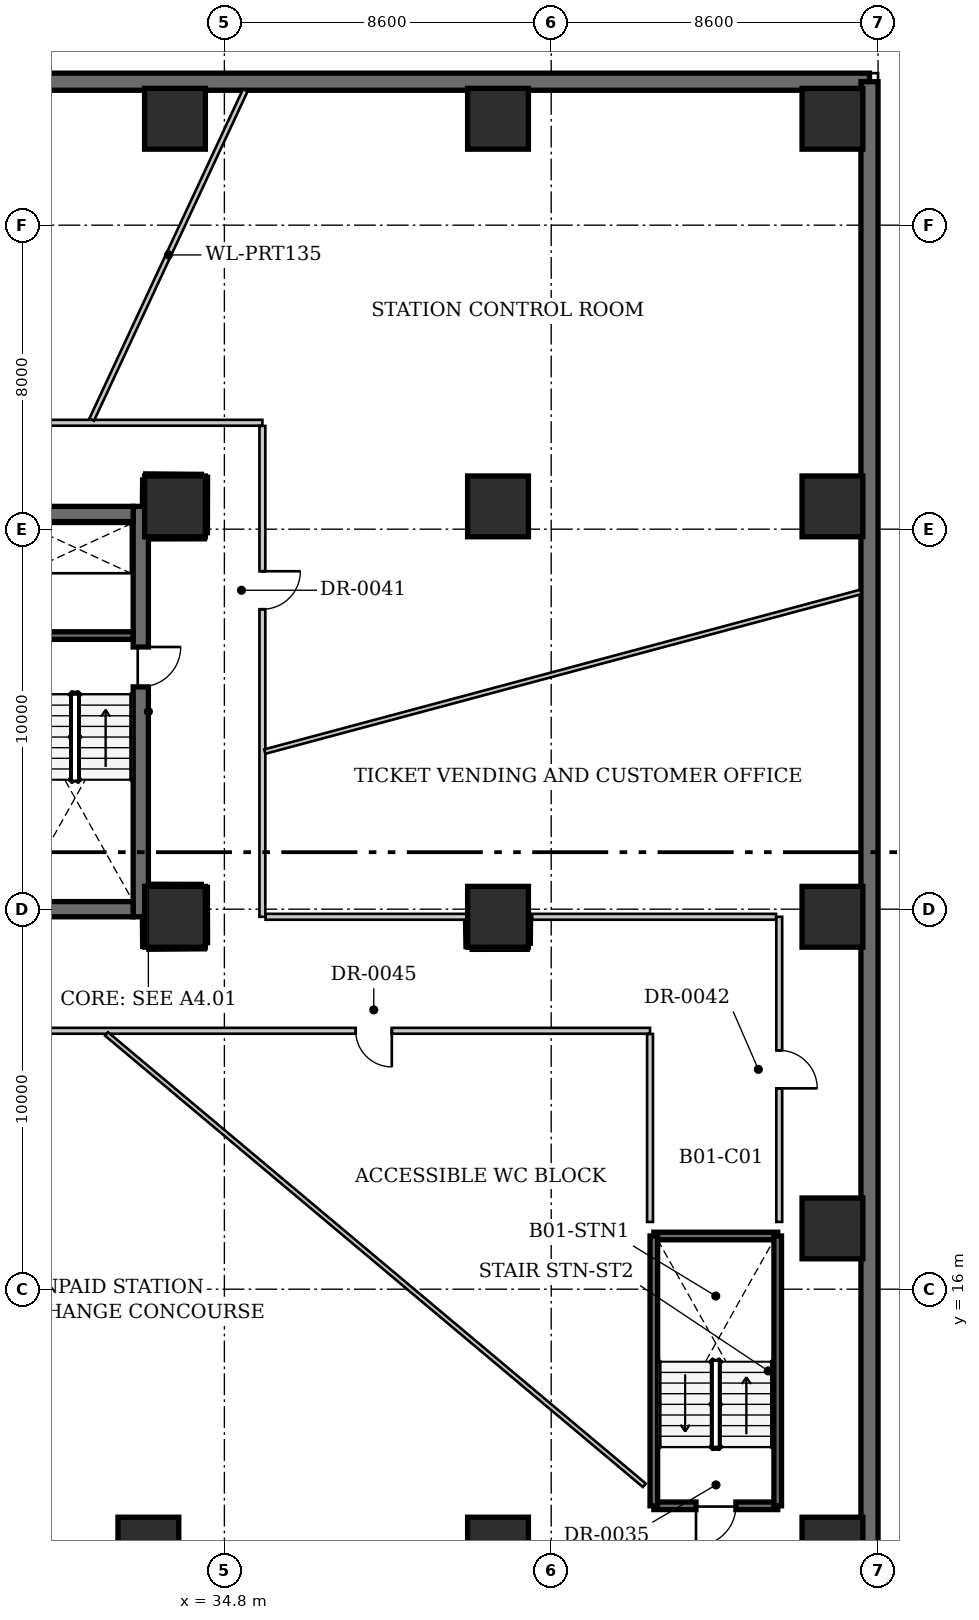
"""IFC4 building model, lengths in metres.
Left out: names, types, materials, properties, quantities, classifications, styles, units other than length and angle.
Written with IfcOpenShell. Run it as: python <this file> out.ifc"""

import sys

from ifc_helpers import new_model, si_unit, direction, frame, frame_2d, origin, origin_2d, place, context, subcontext, project, spatial, rectangle, extrude, source, transform, mapped, element, fill, save


model = new_model("IFC4")
c1 = context("Model", 3, precision=1e-05, world=origin(), true_north=direction((0.0, 1.0)))
c2 = subcontext(c1, "Body", "Model", "MODEL_VIEW")
j1 = project(units=[si_unit("LENGTHUNIT", "METRE"), si_unit("PLANEANGLEUNIT", "RADIAN")], contexts=[c1])
p1 = place(None, origin())
s1 = spatial("IfcSite", under=j1, at=p1, CompositionType="ELEMENT")
p2 = place(p1, origin())
s2 = spatial("IfcBuilding", under=s1, at=p2, CompositionType="ELEMENT")
p3 = place(p2, frame((0.0, 0.0, -5.8)))
s3 = spatial("IfcBuildingStorey", under=s2, at=p3, CompositionType="ELEMENT", Elevation=-5.8)
for number, where, z_axis, x_axis in (
    (1, (50.8, 9.2, 0.0), (0.0, 0.0, 1.0), (1.0, 0.0, 0.0)),
    (2, (50.8, 17.6, 0.0), (0.0, 0.0, 1.0), (1.0, 0.0, 0.0)),
    (3, (50.8, 25.8, 0.0), (0.0, 0.0, 1.0), (1.0, 0.0, 0.0)),
    (4, (50.8, 36.6, 0.0), (0.0, 0.0, 1.0), (1.0, 0.0, 0.0)),
    (5, (50.8, 46.8, 0.0), (0.0, 0.0, 1.0), (1.0, 0.0, 0.0)),
    (6, (32.8, 9.2, 0.0), (0.0, 0.0, 1.0), (1.0, 0.0, 0.0)),
    (7, (42.0, 9.2, 0.0), (0.0, 0.0, 1.0), (1.0, 0.0, 0.0)),
    (8, (33.5, 46.8, 0.0), (0.0, 0.0, 1.0), (1.0, 0.0, 0.0)),
    (9, (42.0, 46.8, 0.0), (0.0, 0.0, 1.0), (1.0, 0.0, 0.0)),
    (10, (33.5, 25.8, 0.0), (0.0, 0.0, 1.0), (1.0, 0.0, 0.0)),
    (11, (33.5, 36.6, 0.0), (0.0, 0.0, 1.0), (1.0, 0.0, 0.0)),
    (12, (42.0, 25.8, 0.0), (0.0, 0.0, 1.0), (1.0, 0.0, 0.0)),
    (13, (42.0, 36.6, 0.0), (0.0, 0.0, 1.0), (1.0, 0.0, 0.0)),
):
    element("IfcColumn", number, at=place(p3, frame(where, z_axis=z_axis, x_axis=x_axis)), inside=s3, PredefinedType="COLUMN", context=c2, shape_type="SweptSolid", body=[
        extrude(rectangle(XDim=1.6, YDim=1.6, at=origin_2d()), origin(), (0.0, 0.0, 1.0), 5.45),
    ])
p4 = place(p3, frame((0.225, 47.775, 0.0), z_axis=(0.0, 0.0, 1.0), x_axis=(1.0, 0.0, 0.0)))
e14 = element("IfcWall", 14, at=p4, inside=s3, PredefinedType="SHEAR", context=c2, shape_type="SweptSolid", body=[
    extrude(rectangle(XDim=51.55, YDim=0.45, at=frame_2d((25.775, 0.0))), origin(), (0.0, 0.0, 1.0), 5.8),
])
p5 = place(p3, frame((51.775, 47.775, 0.0), z_axis=(0.0, 0.0, 1.0), x_axis=(0.0, -1.0, 0.0)))
e15 = element("IfcWall", 15, at=p5, inside=s3, PredefinedType="SHEAR", context=c2, shape_type="SweptSolid", body=[
    extrude(rectangle(XDim=39.55, YDim=0.45, at=frame_2d((19.775, 0.0))), origin(), (0.0, 0.0, 1.0), 5.8),
])
p6 = place(p3, frame((32.6, 36.6, 0.0), z_axis=(0.0, 0.0, 1.0), x_axis=(0.0, -1.0, 0.0)))
e16 = element("IfcWall", 16, at=p6, inside=s3, PredefinedType="SHEAR", context=c2, shape_type="SweptSolid", body=[
    extrude(rectangle(XDim=10.8, YDim=0.4, at=frame_2d((5.4, 0.0))), origin(), (0.0, 0.0, 1.0), 5.8),
])
p7 = place(p6, frame((3.7, 0.0, 0.0)))
e17 = element("IfcOpeningElement", 17, at=p7, cuts=e16, PredefinedType="OPENING", context=c2, shape_type="SweptSolid", body=[
    extrude(rectangle(XDim=1.05, YDim=2.15, at=frame_2d((0.525, 1.075))), frame((0.0, 0.21, 0.0), z_axis=(0.0, -1.0, 0.0), x_axis=(1.0, 0.0, 0.0)), (0.0, 0.0, 1.0), 0.42),
])
p8 = place(p3, frame((19.6, 36.4, 0.0), z_axis=(0.0, 0.0, 1.0), x_axis=(1.0, 0.0, 0.0)))
e18 = element("IfcWall", 18, at=p8, inside=s3, PredefinedType="SHEAR", context=c2, shape_type="SweptSolid", body=[
    extrude(rectangle(XDim=12.8, YDim=0.4, at=frame_2d((6.4, 0.0))), origin(), (0.0, 0.0, 1.0), 5.8),
])
p9 = place(p3, frame((32.4, 26.0, 0.0), z_axis=(0.0, 0.0, 1.0), x_axis=(-1.0, 0.0, 0.0)))
e19 = element("IfcWall", 19, at=p9, inside=s3, PredefinedType="SHEAR", context=c2, shape_type="SweptSolid", body=[
    extrude(rectangle(XDim=12.8, YDim=0.4, at=frame_2d((6.4, 0.0))), origin(), (0.0, 0.0, 1.0), 5.8),
])
p10 = place(p9, frame((10.75, 0.0, 0.0)))
e20 = element("IfcOpeningElement", 20, at=p10, cuts=e19, PredefinedType="OPENING", context=c2, shape_type="SweptSolid", body=[
    extrude(rectangle(XDim=1.05, YDim=2.15, at=frame_2d((0.525, 1.075))), frame((0.0, 0.21, 0.0), z_axis=(0.0, -1.0, 0.0), x_axis=(1.0, 0.0, 0.0)), (0.0, 0.0, 1.0), 0.42),
])
p11 = place(p9, frame((5.67, 0.0, 0.0)))
e21 = element("IfcOpeningElement", 21, at=p11, cuts=e19, PredefinedType="OPENING", context=c2, shape_type="SweptSolid", body=[
    extrude(rectangle(XDim=1.45, YDim=2.2, at=frame_2d((0.725, 1.1))), frame((0.0, 0.21, 0.0), z_axis=(0.0, -1.0, 0.0), x_axis=(1.0, 0.0, 0.0)), (0.0, 0.0, 1.0), 0.42),
])
p12 = place(p3, frame((29.34, 33.2, 0.0), z_axis=(0.0, 0.0, 1.0), x_axis=(1.0, 0.0, 0.0)))
e22 = element("IfcWall", 22, at=p12, inside=s3, PredefinedType="SHEAR", context=c2, shape_type="SweptSolid", body=[
    extrude(rectangle(XDim=3.06, YDim=0.2, at=frame_2d((1.53, 0.0))), origin(), (0.0, 0.0, 1.0), 5.8),
])
p13 = place(p3, frame((49.36, 10.3, 0.0), z_axis=(0.0, 0.0, 1.0), x_axis=(-1.0, 0.0, 0.0)))
e23 = element("IfcWall", 23, at=p13, inside=s3, PredefinedType="SHEAR", context=c2, shape_type="SweptSolid", body=[
    extrude(rectangle(XDim=3.26, YDim=0.2, at=frame_2d((1.63, 0.0))), origin(), (0.0, 0.0, 1.0), 5.8),
])
p14 = place(p13, frame((1.1, 0.0, 0.0)))
e24 = element("IfcOpeningElement", 24, at=p14, cuts=e23, PredefinedType="OPENING", context=c2, shape_type="SweptSolid", body=[
    extrude(rectangle(XDim=1.05, YDim=2.15, at=frame_2d((0.525, 1.075))), frame((0.0, 0.11, 0.0), z_axis=(0.0, -1.0, 0.0), x_axis=(1.0, 0.0, 0.0)), (0.0, 0.0, 1.0), 0.22),
])
p15 = place(p3, frame((46.1, 17.4, 0.0), z_axis=(0.0, 0.0, 1.0), x_axis=(1.0, 0.0, 0.0)))
e25 = element("IfcWall", 25, at=p15, inside=s3, PredefinedType="SHEAR", context=c2, shape_type="SweptSolid", body=[
    extrude(rectangle(XDim=3.26, YDim=0.2, at=frame_2d((1.63, 0.0))), origin(), (0.0, 0.0, 1.0), 5.8),
])
for number, where, z_axis, x_axis in (
    (26, (46.1, 10.3, 0.0), (0.0, 0.0, 1.0), (0.0, 1.0, 0.0)),
    (27, (49.36, 10.3, 0.0), (0.0, 0.0, 1.0), (0.0, 1.0, 0.0)),
):
    element("IfcWall", number, at=place(p3, frame(where, z_axis=z_axis, x_axis=x_axis)), inside=s3, PredefinedType="SHEAR", context=c2, shape_type="SweptSolid", body=[
        extrude(rectangle(XDim=7.1, YDim=0.2, at=frame_2d((3.55, 0.0))), origin(), (0.0, 0.0, 1.0), 5.8),
    ])
p16 = place(p3, frame((5.67, 38.8, 0.0), z_axis=(0.0, 0.0, 1.0), x_axis=(1.0, 0.0, 0.0)))
e28 = element("IfcWall", 28, at=p16, inside=s3, PredefinedType="PARTITIONING", context=c2, shape_type="SweptSolid", body=[
    extrude(rectangle(XDim=30.13, YDim=0.155, at=frame_2d((15.065, 0.0))), origin(), (0.0, 0.0, 1.0), 5.45),
])
p17 = place(p16, frame((19.224, 0.0, 0.0)))
e29 = element("IfcOpeningElement", 29, at=p17, cuts=e28, PredefinedType="OPENING", context=c2, shape_type="SweptSolid", body=[
    extrude(rectangle(XDim=0.95, YDim=2.15, at=frame_2d((0.475, 1.075))), frame((0.0, 0.087, 0.0), z_axis=(0.0, -1.0, 0.0), x_axis=(1.0, 0.0, 0.0)), (0.0, 0.0, 1.0), 0.175),
])
p18 = place(p16, frame((6.498, 0.0, 0.0)))
e30 = element("IfcOpeningElement", 30, at=p18, cuts=e28, PredefinedType="OPENING", context=c2, shape_type="SweptSolid", body=[
    extrude(rectangle(XDim=0.95, YDim=2.15, at=frame_2d((0.475, 1.075))), frame((0.0, 0.087, 0.0), z_axis=(0.0, -1.0, 0.0), x_axis=(1.0, 0.0, 0.0)), (0.0, 0.0, 1.0), 0.175),
])
p19 = place(p3, frame((35.8, 38.717, 0.0), z_axis=(0.0, 0.0, 1.0), x_axis=(0.0, -1.0, 0.0)))
e31 = element("IfcWall", 31, at=p19, inside=s3, PredefinedType="PARTITIONING", context=c2, shape_type="SweptSolid", body=[
    extrude(rectangle(XDim=12.917, YDim=0.155, at=frame_2d((6.458, 0.0))), origin(), (0.0, 0.0, 1.0), 5.45),
])
p20 = place(p19, frame((3.823, 0.0, 0.0)))
e32 = element("IfcOpeningElement", 32, at=p20, cuts=e31, PredefinedType="OPENING", context=c2, shape_type="SweptSolid", body=[
    extrude(rectangle(XDim=1.0, YDim=2.15, at=frame_2d((0.5, 1.075))), frame((0.0, 0.087, 0.0), z_axis=(0.0, -1.0, 0.0), x_axis=(1.0, 0.0, 0.0)), (0.0, 0.0, 1.0), 0.175),
])
p21 = place(p3, frame((49.4, 25.8, 0.0), z_axis=(0.0, 0.0, 1.0), x_axis=(0.0, -1.0, 0.0)))
e33 = element("IfcWall", 33, at=p21, inside=s3, PredefinedType="PARTITIONING", context=c2, shape_type="SweptSolid", body=[
    extrude(rectangle(XDim=8.03, YDim=0.155, at=frame_2d((4.015, 0.0))), origin(), (0.0, 0.0, 1.0), 5.45),
])
p22 = place(p21, frame((3.515, 0.0, 0.0)))
e34 = element("IfcOpeningElement", 34, at=p22, cuts=e33, PredefinedType="OPENING", context=c2, shape_type="SweptSolid", body=[
    extrude(rectangle(XDim=1.0, YDim=2.15, at=frame_2d((0.5, 1.075))), frame((0.0, 0.087, 0.0), z_axis=(0.0, -1.0, 0.0), x_axis=(1.0, 0.0, 0.0)), (0.0, 0.0, 1.0), 0.175),
])
p23 = place(p3, frame((46.0, 22.8, 0.0), z_axis=(0.0, 0.0, 1.0), x_axis=(-1.0, 0.0, 0.0)))
e35 = element("IfcWall", 35, at=p23, inside=s3, PredefinedType="PARTITIONING", context=c2, shape_type="SweptSolid", body=[
    extrude(rectangle(XDim=43.8, YDim=0.155, at=frame_2d((21.9, 0.0))), origin(), (0.0, 0.0, 1.0), 5.45),
])
p24 = place(p23, frame((33.418, 0.0, 0.0)))
e36 = element("IfcOpeningElement", 36, at=p24, cuts=e35, PredefinedType="OPENING", context=c2, shape_type="SweptSolid", body=[
    extrude(rectangle(XDim=1.0, YDim=2.15, at=frame_2d((0.5, 1.075))), frame((0.0, 0.087, 0.0), z_axis=(0.0, -1.0, 0.0), x_axis=(1.0, 0.0, 0.0)), (0.0, 0.0, 1.0), 0.175),
])
p25 = place(p23, frame((16.866, 0.0, 0.0)))
e37 = element("IfcOpeningElement", 37, at=p25, cuts=e35, PredefinedType="OPENING", context=c2, shape_type="SweptSolid", body=[
    extrude(rectangle(XDim=1.0, YDim=2.15, at=frame_2d((0.5, 1.075))), frame((0.0, 0.087, 0.0), z_axis=(0.0, -1.0, 0.0), x_axis=(1.0, 0.0, 0.0)), (0.0, 0.0, 1.0), 0.175),
])
p26 = place(p23, frame((6.794, 0.0, 0.0)))
e38 = element("IfcOpeningElement", 38, at=p26, cuts=e35, PredefinedType="OPENING", context=c2, shape_type="SweptSolid", body=[
    extrude(rectangle(XDim=0.95, YDim=2.15, at=frame_2d((0.475, 1.075))), frame((0.0, 0.087, 0.0), z_axis=(0.0, -1.0, 0.0), x_axis=(1.0, 0.0, 0.0)), (0.0, 0.0, 1.0), 0.175),
])
p27 = place(p3, frame((32.685, 25.73, 0.0), z_axis=(0.0, 0.0, 1.0), x_axis=(0.010511902743, -0.999944748424, 0.0)))
e39 = element("IfcWall", 39, at=p27, inside=s3, PredefinedType="PARTITIONING", context=c2, shape_type="SweptSolid", body=[
    extrude(rectangle(XDim=0.743, YDim=0.155, at=frame_2d((0.372, 0.0))), origin(), (0.0, 0.0, 1.0), 5.45),
])
p28 = place(p3, frame((32.776, 24.988, 0.0), z_axis=(0.0, 0.0, 1.0), x_axis=(0.999967255963, 0.008092404007, 0.0)))
e40 = element("IfcWall", 40, at=p28, inside=s3, PredefinedType="PARTITIONING", context=c2, shape_type="SweptSolid", body=[
    extrude(rectangle(XDim=1.539, YDim=0.155, at=frame_2d((0.769, 0.0))), origin(), (0.0, 0.0, 1.0), 5.45),
])
p29 = place(p3, frame((34.315, 25.083, 0.0), z_axis=(0.0, 0.0, 1.0), x_axis=(-0.002717815702, 0.999996306732, 0.0)))
e41 = element("IfcWall", 41, at=p29, inside=s3, PredefinedType="PARTITIONING", context=c2, shape_type="SweptSolid", body=[
    extrude(rectangle(XDim=1.527, YDim=0.155, at=frame_2d((0.764, 0.0))), origin(), (0.0, 0.0, 1.0), 5.45),
])
p30 = place(p3, frame((34.227, 26.611, 0.0), z_axis=(0.0, 0.0, 1.0), x_axis=(-0.999995856473, 0.002878721429, 0.0)))
e42 = element("IfcWall", 42, at=p30, inside=s3, PredefinedType="PARTITIONING", context=c2, shape_type="SweptSolid", body=[
    extrude(rectangle(XDim=1.357, YDim=0.155, at=frame_2d((0.678, 0.0))), origin(), (0.0, 0.0, 1.0), 5.45),
])
p31 = place(p3, frame((32.87, 35.785, 0.0), z_axis=(0.0, 0.0, 1.0), x_axis=(0.99999584892, 0.002881343971, 0.0)))
e43 = element("IfcWall", 43, at=p31, inside=s3, PredefinedType="PARTITIONING", context=c2, shape_type="SweptSolid", body=[
    extrude(rectangle(XDim=1.44, YDim=0.155, at=frame_2d((0.72, 0.0))), origin(), (0.0, 0.0, 1.0), 5.45),
])
p32 = place(p3, frame((34.311, 35.873, 0.0), z_axis=(0.0, 0.0, 1.0), x_axis=(0.002717815702, 0.999996306732, 0.0)))
e44 = element("IfcWall", 44, at=p32, inside=s3, PredefinedType="PARTITIONING", context=c2, shape_type="SweptSolid", body=[
    extrude(rectangle(XDim=1.527, YDim=0.155, at=frame_2d((0.764, 0.0))), origin(), (0.0, 0.0, 1.0), 5.45),
])
p33 = place(p3, frame((34.231, 37.401, 0.0), z_axis=(0.0, 0.0, 1.0), x_axis=(-0.999967255963, 0.008092404007, 0.0)))
e45 = element("IfcWall", 45, at=p33, inside=s3, PredefinedType="PARTITIONING", context=c2, shape_type="SweptSolid", body=[
    extrude(rectangle(XDim=1.539, YDim=0.155, at=frame_2d((0.769, 0.0))), origin(), (0.0, 0.0, 1.0), 5.45),
])
p34 = place(p3, frame((32.692, 37.33, 0.0), z_axis=(0.0, 0.0, 1.0), x_axis=(-0.010362137944, -0.999946311607, 0.0)))
e46 = element("IfcWall", 46, at=p34, inside=s3, PredefinedType="PARTITIONING", context=c2, shape_type="SweptSolid", body=[
    extrude(rectangle(XDim=0.66, YDim=0.155, at=frame_2d((0.33, 0.0))), origin(), (0.0, 0.0, 1.0), 5.45),
])
p35 = place(p3, frame((35.884, 25.8, 0.0), z_axis=(0.0, 0.0, 1.0), x_axis=(1.0, 0.0, 0.0)))
e47 = element("IfcWall", 47, at=p35, inside=s3, PredefinedType="PARTITIONING", context=c2, shape_type="SweptSolid", body=[
    extrude(rectangle(XDim=5.302, YDim=0.155, at=frame_2d((2.651, 0.0))), origin(), (0.0, 0.0, 1.0), 4.225),
])
p36 = place(p3, frame((41.187, 25.717, 0.0), z_axis=(0.0, 0.0, 1.0), x_axis=(0.01835471782, -0.999831537977, 0.0)))
e48 = element("IfcWall", 48, at=p36, inside=s3, PredefinedType="PARTITIONING", context=c2, shape_type="SweptSolid", body=[
    extrude(rectangle(XDim=0.732, YDim=0.155, at=frame_2d((0.366, 0.0))), origin(), (0.0, 0.0, 1.0), 5.45),
])
p37 = place(p3, frame((41.283, 24.985, 0.0), z_axis=(0.0, 0.0, 1.0), x_axis=(0.99999937099, 0.00112161442, 0.0)))
e49 = element("IfcWall", 49, at=p37, inside=s3, PredefinedType="PARTITIONING", context=c2, shape_type="SweptSolid", body=[
    extrude(rectangle(XDim=1.524, YDim=0.155, at=frame_2d((0.762, 0.0))), origin(), (0.0, 0.0, 1.0), 5.45),
])
p38 = place(p3, frame((42.808, 25.07, 0.0), z_axis=(0.0, 0.0, 1.0), x_axis=(0.009701784932, 0.999952936577, 0.0)))
e50 = element("IfcWall", 50, at=p38, inside=s3, PredefinedType="PARTITIONING", context=c2, shape_type="SweptSolid", body=[
    extrude(rectangle(XDim=0.73, YDim=0.155, at=frame_2d((0.365, 0.0))), origin(), (0.0, 0.0, 1.0), 5.45),
])
p39 = place(p3, frame((42.898, 25.8, 0.0), z_axis=(0.0, 0.0, 1.0), x_axis=(1.0, 0.0, 0.0)))
e51 = element("IfcWall", 51, at=p39, inside=s3, PredefinedType="PARTITIONING", context=c2, shape_type="SweptSolid", body=[
    extrude(rectangle(XDim=6.418, YDim=0.155, at=frame_2d((3.209, 0.0))), origin(), (0.0, 0.0, 1.0), 4.225),
])
p40 = place(p3, frame((46.0, 17.77, 0.0), z_axis=(0.0, 0.0, 1.0), x_axis=(0.0, 1.0, 0.0)))
e52 = element("IfcWall", 52, at=p40, inside=s3, PredefinedType="PARTITIONING", context=c2, shape_type="SweptSolid", body=[
    extrude(rectangle(XDim=4.947, YDim=0.155, at=frame_2d((2.473, 0.0))), origin(), (0.0, 0.0, 1.0), 5.45),
])
p41 = place(p3, frame((31.699, 22.717, 0.0), z_axis=(0.0, 0.0, 1.0), x_axis=(0.765973207977, -0.642872494871, 0.0)))
e53 = element("IfcWall", 53, at=p41, inside=s3, PredefinedType="PARTITIONING", context=c2, shape_type="SweptSolid", body=[
    extrude(rectangle(XDim=18.474, YDim=0.12, at=frame_2d((9.237, 0.0))), origin(), (0.0, 0.0, 1.0), 5.45),
])
p42 = place(p3, frame((35.863, 30.147, 0.0), z_axis=(0.0, 0.0, 1.0), x_axis=(0.965926109503, 0.25881798813, 0.0)))
e54 = element("IfcWall", 54, at=p42, inside=s3, PredefinedType="PARTITIONING", context=c2, shape_type="SweptSolid", body=[
    extrude(rectangle(XDim=16.241, YDim=0.12, at=frame_2d((8.12, 0.0))), origin(), (0.0, 0.0, 1.0), 5.012),
])
p43 = place(p3, frame((31.309, 38.884, 0.0), z_axis=(0.0, 0.0, 1.0), x_axis=(0.422597515668, 0.9063174608, 0.0)))
e55 = element("IfcWall", 55, at=p43, inside=s3, PredefinedType="PARTITIONING", context=c2, shape_type="SweptSolid", body=[
    extrude(rectangle(XDim=9.562, YDim=0.135, at=frame_2d((4.781, 0.0))), origin(), (0.0, 0.0, 1.0), 5.45),
])
m1 = source(origin(), c2, "Body", "SweptSolid", [
    extrude(rectangle(XDim=1.05, YDim=2.15, at=frame_2d((0.525, 1.075))), frame((0.0, 0.025, 0.0), z_axis=(0.0, -1.0, 0.0), x_axis=(1.0, 0.0, 0.0)), (0.0, 0.0, 1.0), 0.05),
])
p44 = place(p7, origin())
e56 = element("IfcDoor", 56, at=p44, inside=s3, OperationType="SINGLE_SWING_LEFT", PredefinedType="DOOR", context=c2, shape_type="MappedRepresentation", body=[
    mapped(m1, transform((0.0, 0.0, 0.0), x_axis=(1.0, 0.0, 0.0), y_axis=(0.0, 1.0, 0.0), z_axis=(0.0, 0.0, 1.0), scale=1.0)),
])
fill(e17, e56)
p45 = place(p14, origin())
e57 = element("IfcDoor", 57, at=p45, inside=s3, OperationType="SINGLE_SWING_RIGHT", PredefinedType="DOOR", context=c2, shape_type="MappedRepresentation", body=[
    mapped(m1, transform((0.0, 0.0, 0.0), x_axis=(1.0, 0.0, 0.0), y_axis=(0.0, 1.0, 0.0), z_axis=(0.0, 0.0, 1.0), scale=1.0)),
])
fill(e24, e57)
m2 = source(origin(), c2, "Body", "SweptSolid", [
    extrude(rectangle(XDim=1.0, YDim=2.15, at=frame_2d((0.5, 1.075))), frame((0.0, 0.025, 0.0), z_axis=(0.0, -1.0, 0.0), x_axis=(1.0, 0.0, 0.0)), (0.0, 0.0, 1.0), 0.05),
])
p46 = place(p20, origin())
e58 = element("IfcDoor", 58, at=p46, inside=s3, OperationType="SINGLE_SWING_LEFT", PredefinedType="DOOR", context=c2, shape_type="MappedRepresentation", body=[
    mapped(m2, transform((0.0, 0.0, 0.0), x_axis=(1.0, 0.0, 0.0), y_axis=(0.0, 1.0, 0.0), z_axis=(0.0, 0.0, 1.0), scale=1.0)),
])
fill(e32, e58)
p47 = place(p22, origin())
e59 = element("IfcDoor", 59, at=p47, inside=s3, OperationType="SINGLE_SWING_RIGHT", PredefinedType="DOOR", context=c2, shape_type="MappedRepresentation", body=[
    mapped(m2, transform((0.0, 0.0, 0.0), x_axis=(1.0, 0.0, 0.0), y_axis=(0.0, 1.0, 0.0), z_axis=(0.0, 0.0, 1.0), scale=1.0)),
])
fill(e34, e59)
m3 = source(origin(), c2, "Body", "SweptSolid", [
    extrude(rectangle(XDim=0.95, YDim=2.15, at=frame_2d((0.475, 1.075))), frame((0.0, 0.025, 0.0), z_axis=(0.0, -1.0, 0.0), x_axis=(1.0, 0.0, 0.0)), (0.0, 0.0, 1.0), 0.05),
])
p48 = place(p26, origin())
e60 = element("IfcDoor", 60, at=p48, inside=s3, OperationType="SINGLE_SWING_LEFT", PredefinedType="DOOR", context=c2, shape_type="MappedRepresentation", body=[
    mapped(m3, transform((0.0, 0.0, 0.0), x_axis=(1.0, 0.0, 0.0), y_axis=(0.0, 1.0, 0.0), z_axis=(0.0, 0.0, 1.0), scale=1.0)),
])
fill(e38, e60)
save(model, sys.argv[1])
